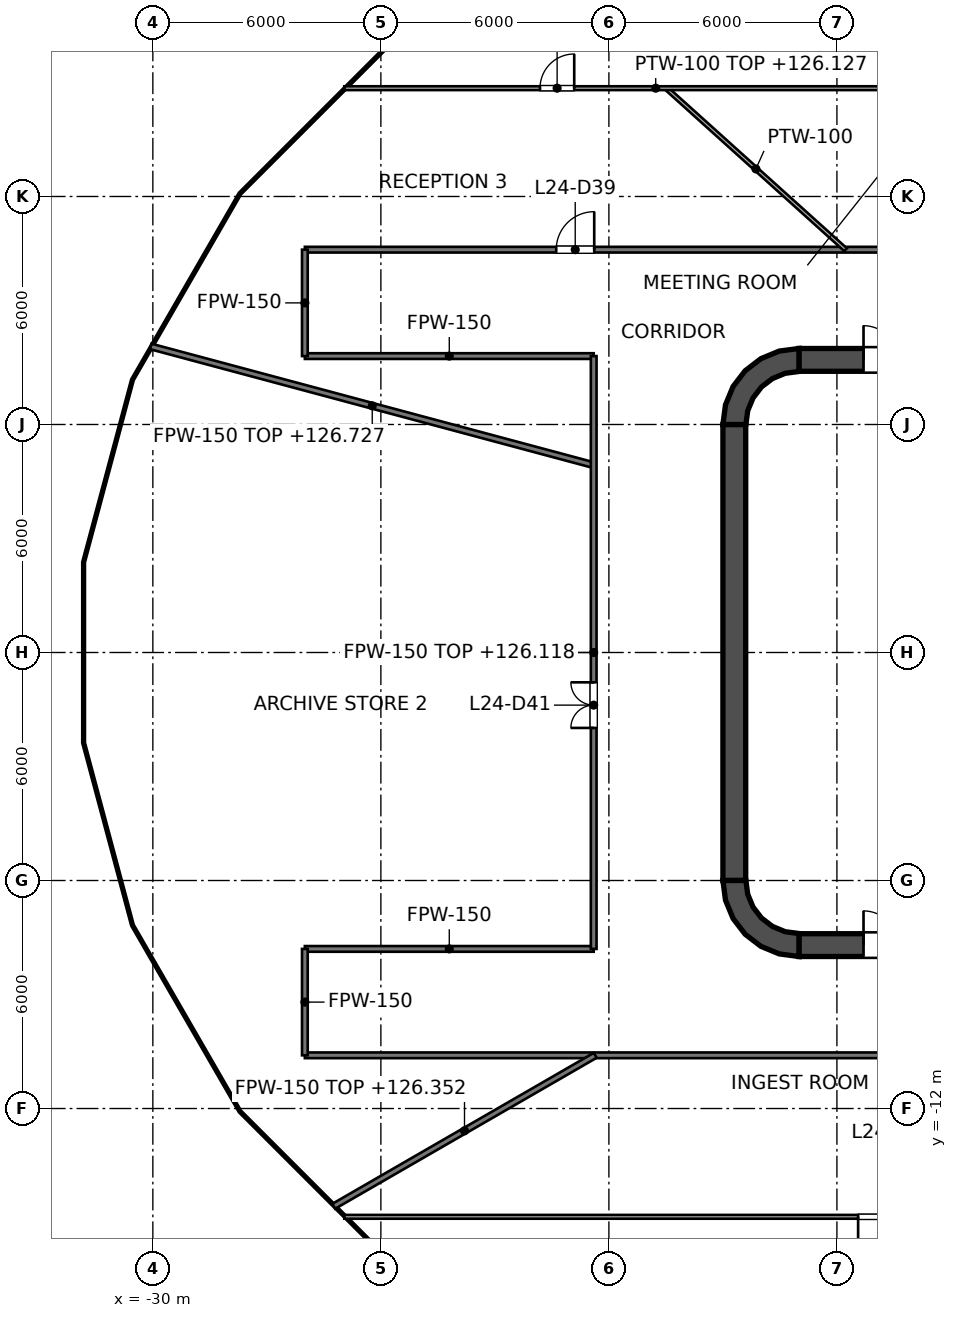
"""IFC4 building model, lengths in metres.
Left out: names, types, materials, properties, quantities, classifications, styles, units other than length and angle.
Written with IfcOpenShell. Run it as: python <this file> out.ifc"""

import sys

from ifc_helpers import new_model, si_unit, direction, frame, frame_2d, origin, place, context, subcontext, project, spatial, polyline, rectangle, outline, extrude, element, fill, save


model = new_model("IFC4")
c1 = context("Model", 3, precision=1e-05, world=origin(), true_north=direction((0.0, 1.0)))
c2 = subcontext(c1, "Body", "Model", "MODEL_VIEW")
j1 = project(units=[si_unit("LENGTHUNIT", "METRE"), si_unit("PLANEANGLEUNIT", "RADIAN")], contexts=[c1])
p1 = place(None, origin())
s1 = spatial("IfcSite", under=j1, at=p1, CompositionType="ELEMENT")
p2 = place(p1, origin())
s2 = spatial("IfcBuilding", under=s1, at=p2, CompositionType="ELEMENT")
p3 = place(p2, frame((0.0, 0.0, 123.0)))
s3 = spatial("IfcBuildingStorey", under=s2, at=p3, CompositionType="ELEMENT", Elevation=123.0)
p4 = place(p3, frame((-13.0, 7.7, 0.0), z_axis=(0.0, 0.0, 1.0), x_axis=(1.0, 0.0, 0.0)))
e1 = element("IfcWall", 1, at=p4, inside=s3, PredefinedType="SHEAR", context=c2, shape_type="SweptSolid", body=[
    extrude(rectangle(XDim=26.0, YDim=0.6, at=frame_2d((13.0, 0.0))), origin(), (0.0, 0.0, 1.0), 4.2),
])
p5 = place(p4, frame((1.7, 0.0, 0.0)))
e2 = element("IfcOpeningElement", 2, at=p5, cuts=e1, PredefinedType="OPENING", context=c2, shape_type="SweptSolid", body=[
    extrude(rectangle(XDim=1.8, YDim=2.1, at=frame_2d((0.9, 1.05))), frame((0.0, 0.3, 0.0), z_axis=(0.0, -1.0, 0.0), x_axis=(1.0, 0.0, 0.0)), (0.0, 0.0, 1.0), 0.6),
])
p6 = place(p4, frame((22.5, 0.0, 0.0)))
e3 = element("IfcOpeningElement", 3, at=p6, cuts=e1, PredefinedType="OPENING", context=c2, shape_type="SweptSolid", body=[
    extrude(rectangle(XDim=1.8, YDim=2.1, at=frame_2d((0.9, 1.05))), frame((0.0, 0.3, 0.0), z_axis=(0.0, -1.0, 0.0), x_axis=(1.0, 0.0, 0.0)), (0.0, 0.0, 1.0), 0.6),
])
p7 = place(p3, frame((-13.0, -7.7, 0.0), z_axis=(0.0, 0.0, 1.0), x_axis=(1.0, 0.0, 0.0)))
e4 = element("IfcWall", 4, at=p7, inside=s3, PredefinedType="SHEAR", context=c2, shape_type="SweptSolid", body=[
    extrude(rectangle(XDim=26.0, YDim=0.6, at=frame_2d((13.0, 0.0))), origin(), (0.0, 0.0, 1.0), 4.2),
])
p8 = place(p7, frame((1.7, 0.0, 0.0)))
e5 = element("IfcOpeningElement", 5, at=p8, cuts=e4, PredefinedType="OPENING", context=c2, shape_type="SweptSolid", body=[
    extrude(rectangle(XDim=1.8, YDim=2.1, at=frame_2d((0.9, 1.05))), frame((0.0, 0.3, 0.0), z_axis=(0.0, -1.0, 0.0), x_axis=(1.0, 0.0, 0.0)), (0.0, 0.0, 1.0), 0.6),
])
p9 = place(p7, frame((22.5, 0.0, 0.0)))
e6 = element("IfcOpeningElement", 6, at=p9, cuts=e4, PredefinedType="OPENING", context=c2, shape_type="SweptSolid", body=[
    extrude(rectangle(XDim=1.8, YDim=2.1, at=frame_2d((0.9, 1.05))), frame((0.0, 0.3, 0.0), z_axis=(0.0, -1.0, 0.0), x_axis=(1.0, 0.0, 0.0)), (0.0, 0.0, 1.0), 0.6),
])
p10 = place(p3, frame((-14.7, -6.0, 0.0), z_axis=(0.0, 0.0, 1.0), x_axis=(0.0, 1.0, 0.0)))
e7 = element("IfcWall", 7, at=p10, inside=s3, PredefinedType="SHEAR", context=c2, shape_type="SweptSolid", body=[
    extrude(rectangle(XDim=12.0, YDim=0.6, at=frame_2d((6.0, 0.0))), origin(), (0.0, 0.0, 1.0), 4.2),
])
p11 = place(p3, origin())
e8 = element("IfcWall", 8, at=p11, inside=s3, PredefinedType="SHEAR", context=c2, shape_type="SweptSolid", body=[
    extrude(outline(polyline([(-15.0, 6.0), (-14.395, 6.0), (-14.347, 6.361), (-14.208, 6.698), (-13.986, 6.986), (-13.698, 7.208), (-13.361, 7.347), (-13.0, 7.395), (-13.0, 8.0), (-13.518, 7.932), (-14.0, 7.732), (-14.414, 7.414), (-14.732, 7.0), (-14.932, 6.518), (-15.0, 6.0)])), origin(), (0.0, 0.0, 1.0), 4.2),
])
e9 = element("IfcWall", 9, at=p11, inside=s3, PredefinedType="SHEAR", context=c2, shape_type="SweptSolid", body=[
    extrude(outline(polyline([(-13.0, -8.0), (-13.0, -7.395), (-13.361, -7.347), (-13.698, -7.208), (-13.986, -6.986), (-14.208, -6.698), (-14.347, -6.361), (-14.395, -6.0), (-15.0, -6.0), (-14.932, -6.518), (-14.732, -7.0), (-14.414, -7.414), (-14.0, -7.732), (-13.518, -7.932), (-13.0, -8.0)])), origin(), (0.0, 0.0, 1.0), 4.2),
])
p12 = place(p3, frame((-11.8, -7.4, 0.0), z_axis=(0.0, 0.0, 1.0), x_axis=(0.0, 1.0, 0.0)))
e10 = element("IfcWall", 10, at=p12, inside=s3, PredefinedType="SOLIDWALL", context=c2, shape_type="SweptSolid", body=[
    extrude(rectangle(XDim=14.8, YDim=0.4, at=frame_2d((7.4, 0.0))), origin(), (0.0, 0.0, 1.0), 4.05),
])
p13 = place(p12, frame((11.2, 0.0, 0.0)))
e11 = element("IfcOpeningElement", 11, at=p13, cuts=e10, PredefinedType="OPENING", context=c2, shape_type="SweptSolid", body=[
    extrude(rectangle(XDim=1.1, YDim=2.1, at=frame_2d((0.55, 1.05))), frame((0.0, 0.2, 0.0), z_axis=(0.0, -1.0, 0.0), x_axis=(1.0, 0.0, 0.0)), (0.0, 0.0, 1.0), 0.4),
])
p14 = place(p12, frame((8.3, 0.0, 0.0)))
e12 = element("IfcOpeningElement", 12, at=p14, cuts=e10, PredefinedType="OPENING", context=c2, shape_type="SweptSolid", body=[
    extrude(rectangle(XDim=1.1, YDim=2.1, at=frame_2d((0.55, 1.05))), frame((0.0, 0.2, 0.0), z_axis=(0.0, -1.0, 0.0), x_axis=(1.0, 0.0, 0.0)), (0.0, 0.0, 1.0), 0.4),
])
p15 = place(p12, frame((5.4, 0.0, 0.0)))
e13 = element("IfcOpeningElement", 13, at=p15, cuts=e10, PredefinedType="OPENING", context=c2, shape_type="SweptSolid", body=[
    extrude(rectangle(XDim=1.1, YDim=2.1, at=frame_2d((0.55, 1.05))), frame((0.0, 0.2, 0.0), z_axis=(0.0, -1.0, 0.0), x_axis=(1.0, 0.0, 0.0)), (0.0, 0.0, 1.0), 0.4),
])
p16 = place(p12, frame((13.552, 0.0, 0.0)))
e14 = element("IfcOpeningElement", 14, at=p16, cuts=e10, PredefinedType="OPENING", context=c2, shape_type="SweptSolid", body=[
    extrude(rectangle(XDim=0.9, YDim=2.1, at=frame_2d((0.45, 1.05))), frame((0.0, 0.2, 0.0), z_axis=(0.0, -1.0, 0.0), x_axis=(1.0, 0.0, 0.0)), (0.0, 0.0, 1.0), 0.4),
])
p17 = place(p12, frame((0.347, 0.0, 0.0)))
e15 = element("IfcOpeningElement", 15, at=p17, cuts=e10, PredefinedType="OPENING", context=c2, shape_type="SweptSolid", body=[
    extrude(rectangle(XDim=0.9, YDim=2.1, at=frame_2d((0.45, 1.05))), frame((0.0, 0.2, 0.0), z_axis=(0.0, -1.0, 0.0), x_axis=(1.0, 0.0, 0.0)), (0.0, 0.0, 1.0), 0.4),
])
e16 = element("IfcWall", 16, at=p11, inside=s3, PredefinedType="SOLIDWALL", context=c2, shape_type="SweptSolid", body=[
    extrude(outline(polyline([(-12.0, -5.925), (-12.0, -5.675), (-14.15, -5.675), (-14.15, -3.025), (-12.0, -3.025), (-12.0, -2.775), (-14.15, -2.775), (-14.15, -0.125), (-12.0, -0.125), (-12.0, 0.125), (-14.15, 0.125), (-14.15, 2.775), (-12.0, 2.775), (-12.0, 3.025), (-14.15, 3.025), (-14.15, 5.675), (-12.0, 5.675), (-12.0, 5.925), (-14.15, 5.925), (-14.4, 5.925), (-14.4, 5.675), (-14.4, 3.025), (-14.4, 2.775), (-14.4, 0.125), (-14.4, -0.125), (-14.4, -2.775), (-14.4, -3.025), (-14.4, -5.675), (-14.4, -5.925), (-14.15, -5.925), (-12.0, -5.925)])), origin(), (0.0, 0.0, 1.0), 4.05),
])
p18 = place(p3, frame((-30.054, 8.053, 0.0), z_axis=(0.0, 0.0, 1.0), x_axis=(0.96591851449, -0.258846331567, 0.0)))
e17 = element("IfcWall", 17, at=p18, inside=s3, PredefinedType="PARTITIONING", context=c2, shape_type="SweptSolid", body=[
    extrude(rectangle(XDim=12.065, YDim=0.15, at=frame_2d((6.033, 0.0))), origin(), (0.0, 0.0, 1.0), 3.727),
])
p19 = place(p3, frame((-26.0, -10.6, 0.0), z_axis=(0.0, 0.0, 1.0), x_axis=(1.0, 0.0, 0.0)))
e18 = element("IfcWall", 18, at=p19, inside=s3, PredefinedType="PARTITIONING", context=c2, shape_type="SweptSolid", body=[
    extrude(rectangle(XDim=52.0, YDim=0.15, at=frame_2d((26.0, 0.0))), origin(), (0.0, 0.0, 1.0), 3.127),
])
p20 = place(p19, frame((17.62, 0.0, 0.0)))
e19 = element("IfcOpeningElement", 19, at=p20, cuts=e18, PredefinedType="OPENING", context=c2, shape_type="SweptSolid", body=[
    extrude(rectangle(XDim=1.2, YDim=2.1, at=frame_2d((0.6, 1.05))), frame((0.0, 0.075, 0.0), z_axis=(0.0, -1.0, 0.0), x_axis=(1.0, 0.0, 0.0)), (0.0, 0.0, 1.0), 0.15),
])
p21 = place(p19, frame((30.25, 0.0, 0.0)))
e20 = element("IfcOpeningElement", 20, at=p21, cuts=e18, PredefinedType="OPENING", context=c2, shape_type="SweptSolid", body=[
    extrude(rectangle(XDim=1.0, YDim=2.1, at=frame_2d((0.5, 1.05))), frame((0.0, 0.075, 0.0), z_axis=(0.0, -1.0, 0.0), x_axis=(1.0, 0.0, 0.0)), (0.0, 0.0, 1.0), 0.15),
])
p22 = place(p19, frame((34.989, 0.0, 0.0)))
e21 = element("IfcOpeningElement", 21, at=p22, cuts=e18, PredefinedType="OPENING", context=c2, shape_type="SweptSolid", body=[
    extrude(rectangle(XDim=1.0, YDim=2.1, at=frame_2d((0.5, 1.05))), frame((0.0, 0.075, 0.0), z_axis=(0.0, -1.0, 0.0), x_axis=(1.0, 0.0, 0.0)), (0.0, 0.0, 1.0), 0.15),
])
p23 = place(p19, frame((44.658, 0.0, 0.0)))
e22 = element("IfcOpeningElement", 22, at=p23, cuts=e18, PredefinedType="OPENING", context=c2, shape_type="SweptSolid", body=[
    extrude(rectangle(XDim=1.0, YDim=2.1, at=frame_2d((0.5, 1.05))), frame((0.0, 0.075, 0.0), z_axis=(0.0, -1.0, 0.0), x_axis=(1.0, 0.0, 0.0)), (0.0, 0.0, 1.0), 0.15),
])
for number, where, z_axis, x_axis in (
    (23, (-26.0, -7.8, 0.0), (0.0, 0.0, 1.0), (1.0, 0.0, 0.0)),
    (24, (-26.0, 7.8, 0.0), (0.0, 0.0, 1.0), (1.0, 0.0, 0.0)),
):
    element("IfcWall", number, at=place(p3, frame(where, z_axis=z_axis, x_axis=x_axis)), inside=s3, PredefinedType="PARTITIONING", context=c2, shape_type="SweptSolid", body=[
        extrude(rectangle(XDim=7.6, YDim=0.15, at=frame_2d((3.8, 0.0))), origin(), (0.0, 0.0, 1.0), 3.276),
    ])
p24 = place(p3, frame((-26.0, 10.6, 0.0), z_axis=(0.0, 0.0, 1.0), x_axis=(1.0, 0.0, 0.0)))
e25 = element("IfcWall", 25, at=p24, inside=s3, PredefinedType="PARTITIONING", context=c2, shape_type="SweptSolid", body=[
    extrude(rectangle(XDim=52.0, YDim=0.15, at=frame_2d((26.0, 0.0))), origin(), (0.0, 0.0, 1.0), 3.127),
])
p25 = place(p24, frame((44.053, 0.0, 0.0)))
e26 = element("IfcOpeningElement", 26, at=p25, cuts=e25, PredefinedType="OPENING", context=c2, shape_type="SweptSolid", body=[
    extrude(rectangle(XDim=1.2, YDim=2.1, at=frame_2d((0.6, 1.05))), frame((0.0, 0.075, 0.0), z_axis=(0.0, -1.0, 0.0), x_axis=(1.0, 0.0, 0.0)), (0.0, 0.0, 1.0), 0.15),
])
p26 = place(p24, frame((35.168, 0.0, 0.0)))
e27 = element("IfcOpeningElement", 27, at=p26, cuts=e25, PredefinedType="OPENING", context=c2, shape_type="SweptSolid", body=[
    extrude(rectangle(XDim=1.0, YDim=2.1, at=frame_2d((0.5, 1.05))), frame((0.0, 0.075, 0.0), z_axis=(0.0, -1.0, 0.0), x_axis=(1.0, 0.0, 0.0)), (0.0, 0.0, 1.0), 0.15),
])
p27 = place(p24, frame((32.577, 0.0, 0.0)))
e28 = element("IfcOpeningElement", 28, at=p27, cuts=e25, PredefinedType="OPENING", context=c2, shape_type="SweptSolid", body=[
    extrude(rectangle(XDim=1.0, YDim=2.1, at=frame_2d((0.5, 1.05))), frame((0.0, 0.075, 0.0), z_axis=(0.0, -1.0, 0.0), x_axis=(1.0, 0.0, 0.0)), (0.0, 0.0, 1.0), 0.15),
])
p28 = place(p24, frame((28.51, 0.0, 0.0)))
e29 = element("IfcOpeningElement", 29, at=p28, cuts=e25, PredefinedType="OPENING", context=c2, shape_type="SweptSolid", body=[
    extrude(rectangle(XDim=1.0, YDim=2.1, at=frame_2d((0.5, 1.05))), frame((0.0, 0.075, 0.0), z_axis=(0.0, -1.0, 0.0), x_axis=(1.0, 0.0, 0.0)), (0.0, 0.0, 1.0), 0.15),
])
p29 = place(p24, frame((22.49, 0.0, 0.0)))
e30 = element("IfcOpeningElement", 30, at=p29, cuts=e25, PredefinedType="OPENING", context=c2, shape_type="SweptSolid", body=[
    extrude(rectangle(XDim=1.0, YDim=2.1, at=frame_2d((0.5, 1.05))), frame((0.0, 0.075, 0.0), z_axis=(0.0, -1.0, 0.0), x_axis=(1.0, 0.0, 0.0)), (0.0, 0.0, 1.0), 0.15),
])
p30 = place(p24, frame((16.554, 0.0, 0.0)))
e31 = element("IfcOpeningElement", 31, at=p30, cuts=e25, PredefinedType="OPENING", context=c2, shape_type="SweptSolid", body=[
    extrude(rectangle(XDim=1.0, YDim=2.1, at=frame_2d((0.5, 1.05))), frame((0.0, 0.075, 0.0), z_axis=(0.0, -1.0, 0.0), x_axis=(1.0, 0.0, 0.0)), (0.0, 0.0, 1.0), 0.15),
])
p31 = place(p24, frame((6.614, 0.0, 0.0)))
e32 = element("IfcOpeningElement", 32, at=p31, cuts=e25, PredefinedType="OPENING", context=c2, shape_type="SweptSolid", body=[
    extrude(rectangle(XDim=1.0, YDim=2.1, at=frame_2d((0.5, 1.05))), frame((0.0, 0.075, 0.0), z_axis=(0.0, -1.0, 0.0), x_axis=(1.0, 0.0, 0.0)), (0.0, 0.0, 1.0), 0.15),
])
p32 = place(p3, frame((-25.24, -14.573, 0.0), z_axis=(0.0, 0.0, 1.0), x_axis=(0.866020312459, 0.500008818331, 0.0)))
e33 = element("IfcWall", 33, at=p32, inside=s3, PredefinedType="PARTITIONING", context=c2, shape_type="SweptSolid", body=[
    extrude(rectangle(XDim=7.946, YDim=0.15, at=frame_2d((3.973, 0.0))), origin(), (0.0, 0.0, 1.0), 3.352),
])
p33 = place(p3, frame((-18.4, -7.8, 0.0), z_axis=(0.0, 0.0, 1.0), x_axis=(0.0, 1.0, 0.0)))
e34 = element("IfcWall", 34, at=p33, inside=s3, PredefinedType="PARTITIONING", context=c2, shape_type="SweptSolid", body=[
    extrude(rectangle(XDim=15.6, YDim=0.15, at=frame_2d((7.8, 0.0))), origin(), (0.0, 0.0, 1.0), 3.118),
])
p34 = place(p33, frame((5.815, 0.0, 0.0)))
e35 = element("IfcOpeningElement", 35, at=p34, cuts=e34, PredefinedType="OPENING", context=c2, shape_type="SweptSolid", body=[
    extrude(rectangle(XDim=1.2, YDim=2.1, at=frame_2d((0.6, 1.05))), frame((0.0, 0.075, 0.0), z_axis=(0.0, -1.0, 0.0), x_axis=(1.0, 0.0, 0.0)), (0.0, 0.0, 1.0), 0.15),
])
for number, where, z_axis, x_axis in (
    (36, (-26.0, -10.6, 0.0), (0.0, 0.0, 1.0), (0.0, 1.0, 0.0)),
    (37, (-26.0, 7.8, 0.0), (0.0, 0.0, 1.0), (0.0, 1.0, 0.0)),
):
    element("IfcWall", number, at=place(p3, frame(where, z_axis=z_axis, x_axis=x_axis)), inside=s3, PredefinedType="PARTITIONING", context=c2, shape_type="SweptSolid", body=[
        extrude(rectangle(XDim=2.8, YDim=0.15, at=frame_2d((1.4, 0.0))), origin(), (0.0, 0.0, 1.0), 3.276),
    ])
p35 = place(p3, frame((-16.492, 14.85, 0.0), z_axis=(0.0, 0.0, 1.0), x_axis=(0.74313548605, -0.669140978698, 0.0)))
e38 = element("IfcWall", 38, at=p35, inside=s3, PredefinedType="PARTITIONING", context=c2, shape_type="SweptSolid", body=[
    extrude(rectangle(XDim=6.351, YDim=0.1, at=frame_2d((3.176, 0.0))), origin(), (0.0, 0.0, 1.0), 4.05),
])
p36 = place(p3, frame((-24.963, -14.85, 0.0), z_axis=(0.0, 0.0, 1.0), x_axis=(1.0, 0.0, 0.0)))
e39 = element("IfcWall", 39, at=p36, inside=s3, PredefinedType="PARTITIONING", context=c2, shape_type="SweptSolid", body=[
    extrude(rectangle(XDim=49.926, YDim=0.1, at=frame_2d((24.963, 0.0))), origin(), (0.0, 0.0, 1.0), 3.127),
])
p37 = place(p36, frame((13.521, 0.0, 0.0)))
e40 = element("IfcOpeningElement", 40, at=p37, cuts=e39, PredefinedType="OPENING", context=c2, shape_type="SweptSolid", body=[
    extrude(rectangle(XDim=1.8, YDim=2.1, at=frame_2d((0.9, 1.05))), frame((0.0, 0.05, 0.0), z_axis=(0.0, -1.0, 0.0), x_axis=(1.0, 0.0, 0.0)), (0.0, 0.0, 1.0), 0.1),
])
p38 = place(p36, frame((43.92, 0.0, 0.0)))
e41 = element("IfcOpeningElement", 41, at=p38, cuts=e39, PredefinedType="OPENING", context=c2, shape_type="SweptSolid", body=[
    extrude(rectangle(XDim=0.9, YDim=2.1, at=frame_2d((0.45, 1.05))), frame((0.0, 0.05, 0.0), z_axis=(0.0, -1.0, 0.0), x_axis=(1.0, 0.0, 0.0)), (0.0, 0.0, 1.0), 0.1),
])
p39 = place(p3, frame((-24.963, 14.85, 0.0), z_axis=(0.0, 0.0, 1.0), x_axis=(1.0, 0.0, 0.0)))
e42 = element("IfcWall", 42, at=p39, inside=s3, PredefinedType="PARTITIONING", context=c2, shape_type="SweptSolid", body=[
    extrude(rectangle(XDim=16.39, YDim=0.1, at=frame_2d((8.195, 0.0))), origin(), (0.0, 0.0, 1.0), 3.127),
])
p40 = place(p39, frame((5.151, 0.0, 0.0)))
e43 = element("IfcOpeningElement", 43, at=p40, cuts=e42, PredefinedType="OPENING", context=c2, shape_type="SweptSolid", body=[
    extrude(rectangle(XDim=0.9, YDim=2.1, at=frame_2d((0.45, 1.05))), frame((0.0, 0.05, 0.0), z_axis=(0.0, -1.0, 0.0), x_axis=(1.0, 0.0, 0.0)), (0.0, 0.0, 1.0), 0.1),
])
p41 = place(p13, origin())
e44 = element("IfcDoor", 44, at=p41, inside=s3, OperationType="DOUBLE_DOOR_SLIDING", PredefinedType="DOOR", context=c2, shape_type="SweptSolid", body=[
    extrude(rectangle(XDim=1.1, YDim=2.1, at=frame_2d((0.55, 1.05))), frame((0.0, 0.025, 0.0), z_axis=(0.0, -1.0, 0.0), x_axis=(1.0, 0.0, 0.0)), (0.0, 0.0, 1.0), 0.05),
])
fill(e11, e44)
p42 = place(p14, origin())
e45 = element("IfcDoor", 45, at=p42, inside=s3, OperationType="DOUBLE_DOOR_SLIDING", PredefinedType="DOOR", context=c2, shape_type="SweptSolid", body=[
    extrude(rectangle(XDim=1.1, YDim=2.1, at=frame_2d((0.55, 1.05))), frame((0.0, 0.025, 0.0), z_axis=(0.0, -1.0, 0.0), x_axis=(1.0, 0.0, 0.0)), (0.0, 0.0, 1.0), 0.05),
])
fill(e12, e45)
p43 = place(p15, origin())
e46 = element("IfcDoor", 46, at=p43, inside=s3, OperationType="DOUBLE_DOOR_SLIDING", PredefinedType="DOOR", context=c2, shape_type="SweptSolid", body=[
    extrude(rectangle(XDim=1.1, YDim=2.1, at=frame_2d((0.55, 1.05))), frame((0.0, 0.025, 0.0), z_axis=(0.0, -1.0, 0.0), x_axis=(1.0, 0.0, 0.0)), (0.0, 0.0, 1.0), 0.05),
])
fill(e13, e46)
p44 = place(p16, origin())
e47 = element("IfcDoor", 47, at=p44, inside=s3, OperationType="SINGLE_SWING_LEFT", PredefinedType="DOOR", context=c2, shape_type="SweptSolid", body=[
    extrude(rectangle(XDim=0.9, YDim=2.1, at=frame_2d((0.45, 1.05))), frame((0.0, 0.025, 0.0), z_axis=(0.0, -1.0, 0.0), x_axis=(1.0, 0.0, 0.0)), (0.0, 0.0, 1.0), 0.05),
])
fill(e14, e47)
p45 = place(p17, origin())
e48 = element("IfcDoor", 48, at=p45, inside=s3, OperationType="SINGLE_SWING_LEFT", PredefinedType="DOOR", context=c2, shape_type="SweptSolid", body=[
    extrude(rectangle(XDim=0.9, YDim=2.1, at=frame_2d((0.45, 1.05))), frame((0.0, 0.025, 0.0), z_axis=(0.0, -1.0, 0.0), x_axis=(1.0, 0.0, 0.0)), (0.0, 0.0, 1.0), 0.05),
])
fill(e15, e48)
p46 = place(p5, origin())
e49 = element("IfcDoor", 49, at=p46, inside=s3, OperationType="DOUBLE_DOOR_SINGLE_SWING", PredefinedType="DOOR", context=c2, shape_type="SweptSolid", body=[
    extrude(rectangle(XDim=1.8, YDim=2.1, at=frame_2d((0.9, 1.05))), frame((0.0, 0.025, 0.0), z_axis=(0.0, -1.0, 0.0), x_axis=(1.0, 0.0, 0.0)), (0.0, 0.0, 1.0), 0.05),
])
fill(e2, e49)
p47 = place(p8, origin())
e50 = element("IfcDoor", 50, at=p47, inside=s3, OperationType="DOUBLE_DOOR_SINGLE_SWING", PredefinedType="DOOR", context=c2, shape_type="SweptSolid", body=[
    extrude(rectangle(XDim=1.8, YDim=2.1, at=frame_2d((0.9, 1.05))), frame((0.0, 0.025, 0.0), z_axis=(0.0, -1.0, 0.0), x_axis=(1.0, 0.0, 0.0)), (0.0, 0.0, 1.0), 0.05),
])
fill(e5, e50)
p48 = place(p37, origin())
e51 = element("IfcDoor", 51, at=p48, inside=s3, OperationType="DOUBLE_DOOR_SINGLE_SWING", PredefinedType="DOOR", context=c2, shape_type="SweptSolid", body=[
    extrude(rectangle(XDim=1.8, YDim=2.1, at=frame_2d((0.9, 1.05))), frame((0.0, 0.025, 0.0), z_axis=(0.0, -1.0, 0.0), x_axis=(1.0, 0.0, 0.0)), (0.0, 0.0, 1.0), 0.05),
])
fill(e40, e51)
p49 = place(p31, origin())
e52 = element("IfcDoor", 52, at=p49, inside=s3, OperationType="SINGLE_SWING_RIGHT", PredefinedType="DOOR", context=c2, shape_type="SweptSolid", body=[
    extrude(rectangle(XDim=1.0, YDim=2.1, at=frame_2d((0.5, 1.05))), frame((0.0, 0.025, 0.0), z_axis=(0.0, -1.0, 0.0), x_axis=(1.0, 0.0, 0.0)), (0.0, 0.0, 1.0), 0.05),
])
fill(e32, e52)
p50 = place(p40, origin())
e53 = element("IfcDoor", 53, at=p50, inside=s3, OperationType="SINGLE_SWING_RIGHT", PredefinedType="DOOR", context=c2, shape_type="SweptSolid", body=[
    extrude(rectangle(XDim=0.9, YDim=2.1, at=frame_2d((0.45, 1.05))), frame((0.0, 0.025, 0.0), z_axis=(0.0, -1.0, 0.0), x_axis=(1.0, 0.0, 0.0)), (0.0, 0.0, 1.0), 0.05),
])
fill(e43, e53)
p51 = place(p34, origin())
e54 = element("IfcDoor", 54, at=p51, inside=s3, OperationType="DOUBLE_DOOR_SINGLE_SWING", PredefinedType="DOOR", context=c2, shape_type="SweptSolid", body=[
    extrude(rectangle(XDim=1.2, YDim=2.1, at=frame_2d((0.6, 1.05))), frame((0.0, 0.025, 0.0), z_axis=(0.0, -1.0, 0.0), x_axis=(1.0, 0.0, 0.0)), (0.0, 0.0, 1.0), 0.05),
])
fill(e35, e54)
save(model, sys.argv[1])
